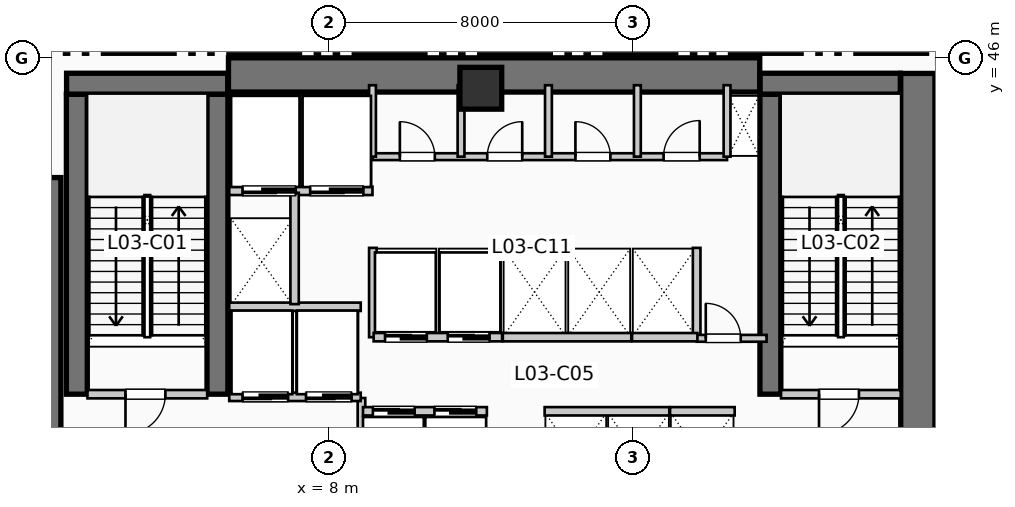
"""IFC4 building model, lengths in metres.
Left out: names, types, materials, properties, quantities, classifications, styles, units other than length and angle.
Written with IfcOpenShell. Run it as: python <this file> out.ifc"""

import sys

from ifc_helpers import new_model, si_unit, direction, frame, frame_2d, origin, origin_2d, place, context, subcontext, project, spatial, rectangle, extrude, element, fill, save


model = new_model("IFC4")
c1 = context("Model", 3, precision=1e-05, world=origin(), true_north=direction((0.0, 1.0)))
c2 = subcontext(c1, "Body", "Model", "MODEL_VIEW")
j1 = project(units=[si_unit("LENGTHUNIT", "METRE"), si_unit("PLANEANGLEUNIT", "RADIAN")], contexts=[c1])
p1 = place(None, origin())
s1 = spatial("IfcSite", under=j1, at=p1, CompositionType="ELEMENT")
p2 = place(p1, origin())
s2 = spatial("IfcBuilding", under=s1, at=p2, CompositionType="ELEMENT")
p3 = place(p2, frame((0.0, 0.0, 16.5)))
s3 = spatial("IfcBuildingStorey", under=s2, at=p3, CompositionType="ELEMENT", Elevation=16.5)
p4 = place(p3, frame((5.36, 45.55, 0.0), z_axis=(0.0, 0.0, 1.0), x_axis=(1.0, 0.0, 0.0)))
e1 = element("IfcWall", 1, at=p4, inside=s3, PredefinedType="SHEAR", context=c2, shape_type="SweptSolid", body=[
    extrude(rectangle(XDim=13.98, YDim=0.9, at=frame_2d((6.99, 0.0))), origin(), (0.0, 0.0, 1.0), 4.62),
])
p5 = place(p3, frame((0.5, 34.95, 0.0), z_axis=(0.0, 0.0, 1.0), x_axis=(0.0, 1.0, 0.0)))
e2 = element("IfcWall", 2, at=p5, inside=s3, PredefinedType="SHEAR", context=c2, shape_type="SweptSolid", body=[
    extrude(rectangle(XDim=7.9, YDim=0.9, at=frame_2d((3.95, 0.0))), origin(), (0.0, 0.0, 1.0), 4.62),
])
p6 = place(p3, frame((23.5, 34.95, 0.0), z_axis=(0.0, 0.0, 1.0), x_axis=(0.0, 1.0, 0.0)))
e3 = element("IfcWall", 3, at=p6, inside=s3, PredefinedType="SHEAR", context=c2, shape_type="SweptSolid", body=[
    extrude(rectangle(XDim=10.64, YDim=0.9, at=frame_2d((5.32, 0.0))), origin(), (0.0, 0.0, 1.0), 4.62),
])
for number, where, z_axis, x_axis in (
    (4, (1.37, 37.15, 0.0), (0.0, 0.0, 1.0), (0.0, 1.0, 0.0)),
    (5, (5.07, 37.15, 0.0), (0.0, 0.0, 1.0), (0.0, 1.0, 0.0)),
):
    element("IfcWall", number, at=place(p3, frame(where, z_axis=z_axis, x_axis=x_axis)), inside=s3, PredefinedType="SHEAR", context=c2, shape_type="SweptSolid", body=[
        extrude(rectangle(XDim=7.89, YDim=0.55, at=frame_2d((3.945, 0.0))), origin(), (0.0, 0.0, 1.0), 4.62),
    ])
p7 = place(p3, frame((1.1, 45.32, 0.0), z_axis=(0.0, 0.0, 1.0), x_axis=(1.0, 0.0, 0.0)))
e6 = element("IfcWall", 6, at=p7, inside=s3, PredefinedType="SHEAR", context=c2, shape_type="SweptSolid", body=[
    extrude(rectangle(XDim=4.24, YDim=0.55, at=frame_2d((2.12, 0.0))), origin(), (0.0, 0.0, 1.0), 4.62),
])
p8 = place(p3, frame((19.62, 37.15, 0.0), z_axis=(0.0, 0.0, 1.0), x_axis=(0.0, 1.0, 0.0)))
e7 = element("IfcWall", 7, at=p8, inside=s3, PredefinedType="SHEAR", context=c2, shape_type="SweptSolid", body=[
    extrude(rectangle(XDim=7.89, YDim=0.55, at=frame_2d((3.945, 0.0))), origin(), (0.0, 0.0, 1.0), 4.62),
])
p9 = place(p3, frame((19.35, 45.32, 0.0), z_axis=(0.0, 0.0, 1.0), x_axis=(1.0, 0.0, 0.0)))
e8 = element("IfcWall", 8, at=p9, inside=s3, PredefinedType="SHEAR", context=c2, shape_type="SweptSolid", body=[
    extrude(rectangle(XDim=3.69, YDim=0.55, at=frame_2d((1.845, 0.0))), origin(), (0.0, 0.0, 1.0), 4.62),
])
p10 = place(p3, frame((12.0, 45.2, 0.0), z_axis=(0.0, 0.0, 1.0), x_axis=(1.0, 0.0, 0.0)))
e9 = element("IfcColumn", 9, at=p10, inside=s3, PredefinedType="COLUMN", context=c2, shape_type="SweptSolid", body=[
    extrude(rectangle(XDim=1.1, YDim=1.1, at=origin_2d()), origin(), (0.0, 0.0, 1.0), 4.62),
])
p11 = place(p3, frame((1.088, 47.834, 0.0), z_axis=(0.0, 0.0, 1.0), x_axis=(-0.707106781187, -0.707106781187, 0.0)))
e10 = element("IfcWall", 10, at=p11, inside=s3, PredefinedType="SOLIDWALL", context=c2, shape_type="SweptSolid", body=[
    extrude(rectangle(XDim=4.133, YDim=0.36, at=frame_2d((2.066, 0.0))), origin(), (0.0, 0.0, 1.0), 4.3),
])
p12 = place(p3, frame((1.65, 37.15, 0.0), z_axis=(0.0, 0.0, 1.0), x_axis=(1.0, 0.0, 0.0)))
e11 = element("IfcWall", 11, at=p12, inside=s3, PredefinedType="PARTITIONING", context=c2, shape_type="SweptSolid", body=[
    extrude(rectangle(XDim=3.15, YDim=0.22, at=frame_2d((1.575, 0.0))), origin(), (0.0, 0.0, 1.0), 4.3),
])
p13 = place(p12, frame((2.05, 0.0, 0.0), z_axis=(0.0, 0.0, 1.0), x_axis=(-1.0, 0.0, 0.0)))
e12 = element("IfcOpeningElement", 12, at=p13, cuts=e11, PredefinedType="OPENING", context=c2, shape_type="SweptSolid", body=[
    extrude(rectangle(XDim=1.05, YDim=2.15, at=frame_2d((0.525, 1.075))), frame((0.0, 0.12, 0.0), z_axis=(0.0, -1.0, 0.0), x_axis=(1.0, 0.0, 0.0)), (0.0, 0.0, 1.0), 0.24),
])
p14 = place(p3, frame((8.86, 34.55, 0.0), z_axis=(0.0, 0.0, 1.0), x_axis=(0.0, 1.0, 0.0)))
e13 = element("IfcWall", 13, at=p14, inside=s3, PredefinedType="PARTITIONING", context=c2, shape_type="SweptSolid", body=[
    extrude(rectangle(XDim=2.5, YDim=0.2, at=frame_2d((1.25, 0.0))), origin(), (0.0, 0.0, 1.0), 4.3),
])
p15 = place(p3, frame((19.9, 37.15, 0.0), z_axis=(0.0, 0.0, 1.0), x_axis=(1.0, 0.0, 0.0)))
e14 = element("IfcWall", 14, at=p15, inside=s3, PredefinedType="PARTITIONING", context=c2, shape_type="SweptSolid", body=[
    extrude(rectangle(XDim=3.15, YDim=0.22, at=frame_2d((1.575, 0.0))), origin(), (0.0, 0.0, 1.0), 4.3),
])
p16 = place(p15, frame((2.05, 0.0, 0.0), z_axis=(0.0, 0.0, 1.0), x_axis=(-1.0, 0.0, 0.0)))
e15 = element("IfcOpeningElement", 15, at=p16, cuts=e14, PredefinedType="OPENING", context=c2, shape_type="SweptSolid", body=[
    extrude(rectangle(XDim=1.05, YDim=2.15, at=frame_2d((0.525, 1.075))), frame((0.0, 0.12, 0.0), z_axis=(0.0, -1.0, 0.0), x_axis=(1.0, 0.0, 0.0)), (0.0, 0.0, 1.0), 0.24),
])
p17 = place(p3, frame((5.38, 37.08, 0.0), z_axis=(0.0, 0.0, 1.0), x_axis=(1.0, 0.0, 0.0)))
e16 = element("IfcWall", 16, at=p17, inside=s3, PredefinedType="PARTITIONING", context=c2, shape_type="SweptSolid", body=[
    extrude(rectangle(XDim=3.46, YDim=0.22, at=frame_2d((1.73, 0.0))), origin(), (0.0, 0.0, 1.0), 4.3),
])
p18 = place(p17, frame((1.55, 0.0, 0.0), z_axis=(0.0, 0.0, 1.0), x_axis=(-1.0, 0.0, 0.0)))
e17 = element("IfcOpeningElement", 17, at=p18, cuts=e16, PredefinedType="OPENING", context=c2, shape_type="SweptSolid", body=[
    extrude(rectangle(XDim=1.2, YDim=2.2, at=frame_2d((0.6, 1.1))), frame((0.0, 0.12, 0.0), z_axis=(0.0, -1.0, 0.0), x_axis=(1.0, 0.0, 0.0)), (0.0, 0.0, 1.0), 0.24),
])
p19 = place(p17, frame((3.22, 0.0, 0.0), z_axis=(0.0, 0.0, 1.0), x_axis=(-1.0, 0.0, 0.0)))
e18 = element("IfcOpeningElement", 18, at=p19, cuts=e16, PredefinedType="OPENING", context=c2, shape_type="SweptSolid", body=[
    extrude(rectangle(XDim=1.2, YDim=2.2, at=frame_2d((0.6, 1.1))), frame((0.0, 0.12, 0.0), z_axis=(0.0, -1.0, 0.0), x_axis=(1.0, 0.0, 0.0)), (0.0, 0.0, 1.0), 0.24),
])
p20 = place(p3, frame((5.38, 39.45, 0.0), z_axis=(0.0, 0.0, 1.0), x_axis=(1.0, 0.0, 0.0)))
e19 = element("IfcWall", 19, at=p20, inside=s3, PredefinedType="PARTITIONING", context=c2, shape_type="SweptSolid", body=[
    extrude(rectangle(XDim=3.46, YDim=0.22, at=frame_2d((1.73, 0.0))), origin(), (0.0, 0.0, 1.0), 4.3),
])
p21 = place(p3, frame((5.38, 42.5, 0.0), z_axis=(0.0, 0.0, 1.0), x_axis=(1.0, 0.0, 0.0)))
e20 = element("IfcWall", 20, at=p21, inside=s3, PredefinedType="PARTITIONING", context=c2, shape_type="SweptSolid", body=[
    extrude(rectangle(XDim=3.77, YDim=0.22, at=frame_2d((1.885, 0.0))), origin(), (0.0, 0.0, 1.0), 4.3),
])
p22 = place(p21, frame((1.75, 0.0, 0.0), z_axis=(0.0, 0.0, 1.0), x_axis=(-1.0, 0.0, 0.0)))
e21 = element("IfcOpeningElement", 21, at=p22, cuts=e20, PredefinedType="OPENING", context=c2, shape_type="SweptSolid", body=[
    extrude(rectangle(XDim=1.4, YDim=2.2, at=frame_2d((0.7, 1.1))), frame((0.0, 0.12, 0.0), z_axis=(0.0, -1.0, 0.0), x_axis=(1.0, 0.0, 0.0)), (0.0, 0.0, 1.0), 0.24),
])
p23 = place(p21, frame((3.53, 0.0, 0.0), z_axis=(0.0, 0.0, 1.0), x_axis=(-1.0, 0.0, 0.0)))
e22 = element("IfcOpeningElement", 22, at=p23, cuts=e20, PredefinedType="OPENING", context=c2, shape_type="SweptSolid", body=[
    extrude(rectangle(XDim=1.4, YDim=2.2, at=frame_2d((0.7, 1.1))), frame((0.0, 0.12, 0.0), z_axis=(0.0, -1.0, 0.0), x_axis=(1.0, 0.0, 0.0)), (0.0, 0.0, 1.0), 0.24),
])
p24 = place(p3, frame((7.1, 39.52, 0.0), z_axis=(0.0, 0.0, 1.0), x_axis=(0.0, 1.0, 0.0)))
e23 = element("IfcWall", 23, at=p24, inside=s3, PredefinedType="PARTITIONING", context=c2, shape_type="SweptSolid", body=[
    extrude(rectangle(XDim=2.93, YDim=0.22, at=frame_2d((1.465, 0.0))), origin(), (0.0, 0.0, 1.0), 4.3),
])
for number, where, z_axis, x_axis in (
    (24, (9.16, 38.65, 0.0), (0.0, 0.0, 1.0), (0.0, 1.0, 0.0)),
    (25, (17.68, 38.65, 0.0), (0.0, 0.0, 1.0), (0.0, 1.0, 0.0)),
):
    element("IfcWall", number, at=place(p3, frame(where, z_axis=z_axis, x_axis=x_axis)), inside=s3, PredefinedType="PARTITIONING", context=c2, shape_type="SweptSolid", body=[
        extrude(rectangle(XDim=2.35, YDim=0.2, at=frame_2d((1.175, 0.0))), origin(), (0.0, 0.0, 1.0), 4.3),
    ])
p25 = place(p3, frame((17.68, 38.62, 0.0), z_axis=(0.0, 0.0, 1.0), x_axis=(1.0, 0.0, 0.0)))
e26 = element("IfcWall", 26, at=p25, inside=s3, PredefinedType="PARTITIONING", context=c2, shape_type="SweptSolid", body=[
    extrude(rectangle(XDim=1.84, YDim=0.18, at=frame_2d((0.92, 0.0))), origin(), (0.0, 0.0, 1.0), 4.3),
])
p26 = place(p25, frame((0.24, 0.0, 0.0)))
e27 = element("IfcOpeningElement", 27, at=p26, cuts=e26, PredefinedType="OPENING", context=c2, shape_type="SweptSolid", body=[
    extrude(rectangle(XDim=0.92, YDim=2.1, at=frame_2d((0.46, 1.05))), frame((0.0, 0.1, 0.0), z_axis=(0.0, -1.0, 0.0), x_axis=(1.0, 0.0, 0.0)), (0.0, 0.0, 1.0), 0.2),
])
p27 = place(p3, frame((8.9, 36.7, 0.0), z_axis=(0.0, 0.0, 1.0), x_axis=(1.0, 0.0, 0.0)))
e28 = element("IfcWall", 28, at=p27, inside=s3, PredefinedType="PARTITIONING", context=c2, shape_type="SweptSolid", body=[
    extrude(rectangle(XDim=3.26, YDim=0.22, at=frame_2d((1.63, 0.0))), origin(), (0.0, 0.0, 1.0), 4.3),
])
p28 = place(p27, frame((0.26, 0.0, 0.0)))
e29 = element("IfcOpeningElement", 29, at=p28, cuts=e28, PredefinedType="OPENING", context=c2, shape_type="SweptSolid", body=[
    extrude(rectangle(XDim=1.1, YDim=2.2, at=frame_2d((0.55, 1.1))), frame((0.0, 0.12, 0.0), z_axis=(0.0, -1.0, 0.0), x_axis=(1.0, 0.0, 0.0)), (0.0, 0.0, 1.0), 0.24),
])
p29 = place(p27, frame((1.88, 0.0, 0.0)))
e30 = element("IfcOpeningElement", 30, at=p29, cuts=e28, PredefinedType="OPENING", context=c2, shape_type="SweptSolid", body=[
    extrude(rectangle(XDim=1.1, YDim=2.2, at=frame_2d((0.55, 1.1))), frame((0.0, 0.12, 0.0), z_axis=(0.0, -1.0, 0.0), x_axis=(1.0, 0.0, 0.0)), (0.0, 0.0, 1.0), 0.24),
])
p30 = place(p3, frame((9.18, 38.65, 0.0), z_axis=(0.0, 0.0, 1.0), x_axis=(1.0, 0.0, 0.0)))
e31 = element("IfcWall", 31, at=p30, inside=s3, PredefinedType="PARTITIONING", context=c2, shape_type="SweptSolid", body=[
    extrude(rectangle(XDim=3.38, YDim=0.22, at=frame_2d((1.69, 0.0))), origin(), (0.0, 0.0, 1.0), 4.3),
])
p31 = place(p30, frame((0.3, 0.0, 0.0)))
e32 = element("IfcOpeningElement", 32, at=p31, cuts=e31, PredefinedType="OPENING", context=c2, shape_type="SweptSolid", body=[
    extrude(rectangle(XDim=1.1, YDim=2.2, at=frame_2d((0.55, 1.1))), frame((0.0, 0.12, 0.0), z_axis=(0.0, -1.0, 0.0), x_axis=(1.0, 0.0, 0.0)), (0.0, 0.0, 1.0), 0.24),
])
p32 = place(p30, frame((1.95, 0.0, 0.0)))
e33 = element("IfcOpeningElement", 33, at=p32, cuts=e31, PredefinedType="OPENING", context=c2, shape_type="SweptSolid", body=[
    extrude(rectangle(XDim=1.1, YDim=2.2, at=frame_2d((0.55, 1.1))), frame((0.0, 0.12, 0.0), z_axis=(0.0, -1.0, 0.0), x_axis=(1.0, 0.0, 0.0)), (0.0, 0.0, 1.0), 0.24),
])
p33 = place(p3, frame((13.68, 36.7, 0.0), z_axis=(0.0, 0.0, 1.0), x_axis=(1.0, 0.0, 0.0)))
e34 = element("IfcWall", 34, at=p33, inside=s3, PredefinedType="PARTITIONING", context=c2, shape_type="SweptSolid", body=[
    extrude(rectangle(XDim=3.28, YDim=0.22, at=frame_2d((1.64, 0.0))), origin(), (0.0, 0.0, 1.0), 4.3),
])
p34 = place(p3, frame((12.58, 38.65, 0.0), z_axis=(0.0, 0.0, 1.0), x_axis=(1.0, 0.0, 0.0)))
e35 = element("IfcWall", 35, at=p34, inside=s3, PredefinedType="PARTITIONING", context=c2, shape_type="SweptSolid", body=[
    extrude(rectangle(XDim=3.38, YDim=0.22, at=frame_2d((1.69, 0.0))), origin(), (0.0, 0.0, 1.0), 4.3),
])
p35 = place(p3, frame((16.98, 36.7, 0.0), z_axis=(0.0, 0.0, 1.0), x_axis=(1.0, 0.0, 0.0)))
e36 = element("IfcWall", 36, at=p35, inside=s3, PredefinedType="PARTITIONING", context=c2, shape_type="SweptSolid", body=[
    extrude(rectangle(XDim=1.7, YDim=0.22, at=frame_2d((0.85, 0.0))), origin(), (0.0, 0.0, 1.0), 4.3),
])
p36 = place(p3, frame((15.98, 38.65, 0.0), z_axis=(0.0, 0.0, 1.0), x_axis=(1.0, 0.0, 0.0)))
e37 = element("IfcWall", 37, at=p36, inside=s3, PredefinedType="PARTITIONING", context=c2, shape_type="SweptSolid", body=[
    extrude(rectangle(XDim=1.72, YDim=0.22, at=frame_2d((0.86, 0.0))), origin(), (0.0, 0.0, 1.0), 4.3),
])
p37 = place(p3, frame((9.15, 43.4, 0.0), z_axis=(0.0, 0.0, 1.0), x_axis=(1.0, 0.0, 0.0)))
e38 = element("IfcWall", 38, at=p37, inside=s3, PredefinedType="PLUMBINGWALL", context=c2, shape_type="SweptSolid", body=[
    extrude(rectangle(XDim=9.33, YDim=0.18, at=frame_2d((4.665, 0.0))), origin(), (0.0, 0.0, 1.0), 4.3),
])
p38 = place(p37, frame((0.72, 0.0, 0.0)))
e39 = element("IfcOpeningElement", 39, at=p38, cuts=e38, PredefinedType="OPENING", context=c2, shape_type="SweptSolid", body=[
    extrude(rectangle(XDim=0.92, YDim=2.1, at=frame_2d((0.46, 1.05))), frame((0.0, 0.1, 0.0), z_axis=(0.0, -1.0, 0.0), x_axis=(1.0, 0.0, 0.0)), (0.0, 0.0, 1.0), 0.2),
])
p39 = place(p37, frame((3.02, 0.0, 0.0)))
e40 = element("IfcOpeningElement", 40, at=p39, cuts=e38, PredefinedType="OPENING", context=c2, shape_type="SweptSolid", body=[
    extrude(rectangle(XDim=0.92, YDim=2.1, at=frame_2d((0.46, 1.05))), frame((0.0, 0.1, 0.0), z_axis=(0.0, -1.0, 0.0), x_axis=(1.0, 0.0, 0.0)), (0.0, 0.0, 1.0), 0.2),
])
p40 = place(p37, frame((5.34, 0.0, 0.0)))
e41 = element("IfcOpeningElement", 41, at=p40, cuts=e38, PredefinedType="OPENING", context=c2, shape_type="SweptSolid", body=[
    extrude(rectangle(XDim=0.92, YDim=2.1, at=frame_2d((0.46, 1.05))), frame((0.0, 0.1, 0.0), z_axis=(0.0, -1.0, 0.0), x_axis=(1.0, 0.0, 0.0)), (0.0, 0.0, 1.0), 0.2),
])
p41 = place(p37, frame((7.66, 0.0, 0.0)))
e42 = element("IfcOpeningElement", 42, at=p41, cuts=e38, PredefinedType="OPENING", context=c2, shape_type="SweptSolid", body=[
    extrude(rectangle(XDim=0.95, YDim=2.1, at=frame_2d((0.475, 1.05))), frame((0.0, 0.1, 0.0), z_axis=(0.0, -1.0, 0.0), x_axis=(1.0, 0.0, 0.0)), (0.0, 0.0, 1.0), 0.2),
])
for number, where, z_axis, x_axis in (
    (43, (9.15, 43.4, 0.0), (0.0, 0.0, 1.0), (0.0, 1.0, 0.0)),
    (44, (18.48, 43.4, 0.0), (0.0, 0.0, 1.0), (0.0, 1.0, 0.0)),
    (45, (11.48, 43.4, 0.0), (0.0, 0.0, 1.0), (0.0, 1.0, 0.0)),
    (46, (13.78, 43.4, 0.0), (0.0, 0.0, 1.0), (0.0, 1.0, 0.0)),
    (47, (16.12, 43.4, 0.0), (0.0, 0.0, 1.0), (0.0, 1.0, 0.0)),
):
    element("IfcWall", number, at=place(p3, frame(where, z_axis=z_axis, x_axis=x_axis)), inside=s3, PredefinedType="PLUMBINGWALL", context=c2, shape_type="SweptSolid", body=[
        extrude(rectangle(XDim=1.88, YDim=0.18, at=frame_2d((0.94, 0.0))), origin(), (0.0, 0.0, 1.0), 4.3),
    ])
p42 = place(p13, origin())
e48 = element("IfcDoor", 48, at=p42, inside=s3, OperationType="SINGLE_SWING_LEFT", PredefinedType="DOOR", context=c2, shape_type="SweptSolid", body=[
    extrude(rectangle(XDim=1.05, YDim=2.15, at=frame_2d((0.525, 1.075))), frame((0.0, 0.025, 0.0), z_axis=(0.0, -1.0, 0.0), x_axis=(1.0, 0.0, 0.0)), (0.0, 0.0, 1.0), 0.05),
])
fill(e12, e48)
p43 = place(p16, origin())
e49 = element("IfcDoor", 49, at=p43, inside=s3, OperationType="SINGLE_SWING_LEFT", PredefinedType="DOOR", context=c2, shape_type="SweptSolid", body=[
    extrude(rectangle(XDim=1.05, YDim=2.15, at=frame_2d((0.525, 1.075))), frame((0.0, 0.025, 0.0), z_axis=(0.0, -1.0, 0.0), x_axis=(1.0, 0.0, 0.0)), (0.0, 0.0, 1.0), 0.05),
])
fill(e15, e49)
p44 = place(p18, origin())
e50 = element("IfcDoor", 50, at=p44, inside=s3, OperationType="SLIDING_TO_RIGHT", PredefinedType="DOOR", context=c2, shape_type="SweptSolid", body=[
    extrude(rectangle(XDim=1.2, YDim=2.2, at=frame_2d((0.6, 1.1))), frame((0.0, 0.025, 0.0), z_axis=(0.0, -1.0, 0.0), x_axis=(1.0, 0.0, 0.0)), (0.0, 0.0, 1.0), 0.05),
])
fill(e17, e50)
p45 = place(p19, origin())
e51 = element("IfcDoor", 51, at=p45, inside=s3, OperationType="SLIDING_TO_RIGHT", PredefinedType="DOOR", context=c2, shape_type="SweptSolid", body=[
    extrude(rectangle(XDim=1.2, YDim=2.2, at=frame_2d((0.6, 1.1))), frame((0.0, 0.025, 0.0), z_axis=(0.0, -1.0, 0.0), x_axis=(1.0, 0.0, 0.0)), (0.0, 0.0, 1.0), 0.05),
])
fill(e18, e51)
p46 = place(p22, origin())
e52 = element("IfcDoor", 52, at=p46, inside=s3, OperationType="SLIDING_TO_LEFT", PredefinedType="DOOR", context=c2, shape_type="SweptSolid", body=[
    extrude(rectangle(XDim=1.4, YDim=2.2, at=frame_2d((0.7, 1.1))), frame((0.0, 0.025, 0.0), z_axis=(0.0, -1.0, 0.0), x_axis=(1.0, 0.0, 0.0)), (0.0, 0.0, 1.0), 0.05),
])
fill(e21, e52)
p47 = place(p23, origin())
e53 = element("IfcDoor", 53, at=p47, inside=s3, OperationType="SLIDING_TO_LEFT", PredefinedType="DOOR", context=c2, shape_type="SweptSolid", body=[
    extrude(rectangle(XDim=1.4, YDim=2.2, at=frame_2d((0.7, 1.1))), frame((0.0, 0.025, 0.0), z_axis=(0.0, -1.0, 0.0), x_axis=(1.0, 0.0, 0.0)), (0.0, 0.0, 1.0), 0.05),
])
fill(e22, e53)
p48 = place(p26, origin())
e54 = element("IfcDoor", 54, at=p48, inside=s3, OperationType="SINGLE_SWING_LEFT", PredefinedType="DOOR", context=c2, shape_type="SweptSolid", body=[
    extrude(rectangle(XDim=0.92, YDim=2.1, at=frame_2d((0.46, 1.05))), frame((0.0, 0.025, 0.0), z_axis=(0.0, -1.0, 0.0), x_axis=(1.0, 0.0, 0.0)), (0.0, 0.0, 1.0), 0.05),
])
fill(e27, e54)
p49 = place(p28, origin())
e55 = element("IfcDoor", 55, at=p49, inside=s3, OperationType="SLIDING_TO_LEFT", PredefinedType="DOOR", context=c2, shape_type="SweptSolid", body=[
    extrude(rectangle(XDim=1.1, YDim=2.2, at=frame_2d((0.55, 1.1))), frame((0.0, 0.025, 0.0), z_axis=(0.0, -1.0, 0.0), x_axis=(1.0, 0.0, 0.0)), (0.0, 0.0, 1.0), 0.05),
])
fill(e29, e55)
p50 = place(p29, origin())
e56 = element("IfcDoor", 56, at=p50, inside=s3, OperationType="SLIDING_TO_LEFT", PredefinedType="DOOR", context=c2, shape_type="SweptSolid", body=[
    extrude(rectangle(XDim=1.1, YDim=2.2, at=frame_2d((0.55, 1.1))), frame((0.0, 0.025, 0.0), z_axis=(0.0, -1.0, 0.0), x_axis=(1.0, 0.0, 0.0)), (0.0, 0.0, 1.0), 0.05),
])
fill(e30, e56)
p51 = place(p31, origin())
e57 = element("IfcDoor", 57, at=p51, inside=s3, OperationType="SLIDING_TO_LEFT", PredefinedType="DOOR", context=c2, shape_type="SweptSolid", body=[
    extrude(rectangle(XDim=1.1, YDim=2.2, at=frame_2d((0.55, 1.1))), frame((0.0, 0.025, 0.0), z_axis=(0.0, -1.0, 0.0), x_axis=(1.0, 0.0, 0.0)), (0.0, 0.0, 1.0), 0.05),
])
fill(e32, e57)
p52 = place(p32, origin())
e58 = element("IfcDoor", 58, at=p52, inside=s3, OperationType="SLIDING_TO_LEFT", PredefinedType="DOOR", context=c2, shape_type="SweptSolid", body=[
    extrude(rectangle(XDim=1.1, YDim=2.2, at=frame_2d((0.55, 1.1))), frame((0.0, 0.025, 0.0), z_axis=(0.0, -1.0, 0.0), x_axis=(1.0, 0.0, 0.0)), (0.0, 0.0, 1.0), 0.05),
])
fill(e33, e58)
p53 = place(p38, origin())
e59 = element("IfcDoor", 59, at=p53, inside=s3, OperationType="SINGLE_SWING_LEFT", PredefinedType="DOOR", context=c2, shape_type="SweptSolid", body=[
    extrude(rectangle(XDim=0.92, YDim=2.1, at=frame_2d((0.46, 1.05))), frame((0.0, 0.025, 0.0), z_axis=(0.0, -1.0, 0.0), x_axis=(1.0, 0.0, 0.0)), (0.0, 0.0, 1.0), 0.05),
])
fill(e39, e59)
p54 = place(p39, origin())
e60 = element("IfcDoor", 60, at=p54, inside=s3, OperationType="SINGLE_SWING_RIGHT", PredefinedType="DOOR", context=c2, shape_type="SweptSolid", body=[
    extrude(rectangle(XDim=0.92, YDim=2.1, at=frame_2d((0.46, 1.05))), frame((0.0, 0.025, 0.0), z_axis=(0.0, -1.0, 0.0), x_axis=(1.0, 0.0, 0.0)), (0.0, 0.0, 1.0), 0.05),
])
fill(e40, e60)
p55 = place(p40, origin())
e61 = element("IfcDoor", 61, at=p55, inside=s3, OperationType="SINGLE_SWING_LEFT", PredefinedType="DOOR", context=c2, shape_type="SweptSolid", body=[
    extrude(rectangle(XDim=0.92, YDim=2.1, at=frame_2d((0.46, 1.05))), frame((0.0, 0.025, 0.0), z_axis=(0.0, -1.0, 0.0), x_axis=(1.0, 0.0, 0.0)), (0.0, 0.0, 1.0), 0.05),
])
fill(e41, e61)
p56 = place(p41, origin())
e62 = element("IfcDoor", 62, at=p56, inside=s3, OperationType="SINGLE_SWING_RIGHT", PredefinedType="DOOR", context=c2, shape_type="SweptSolid", body=[
    extrude(rectangle(XDim=0.95, YDim=2.1, at=frame_2d((0.475, 1.05))), frame((0.0, 0.025, 0.0), z_axis=(0.0, -1.0, 0.0), x_axis=(1.0, 0.0, 0.0)), (0.0, 0.0, 1.0), 0.05),
])
fill(e42, e62)
save(model, sys.argv[1])
